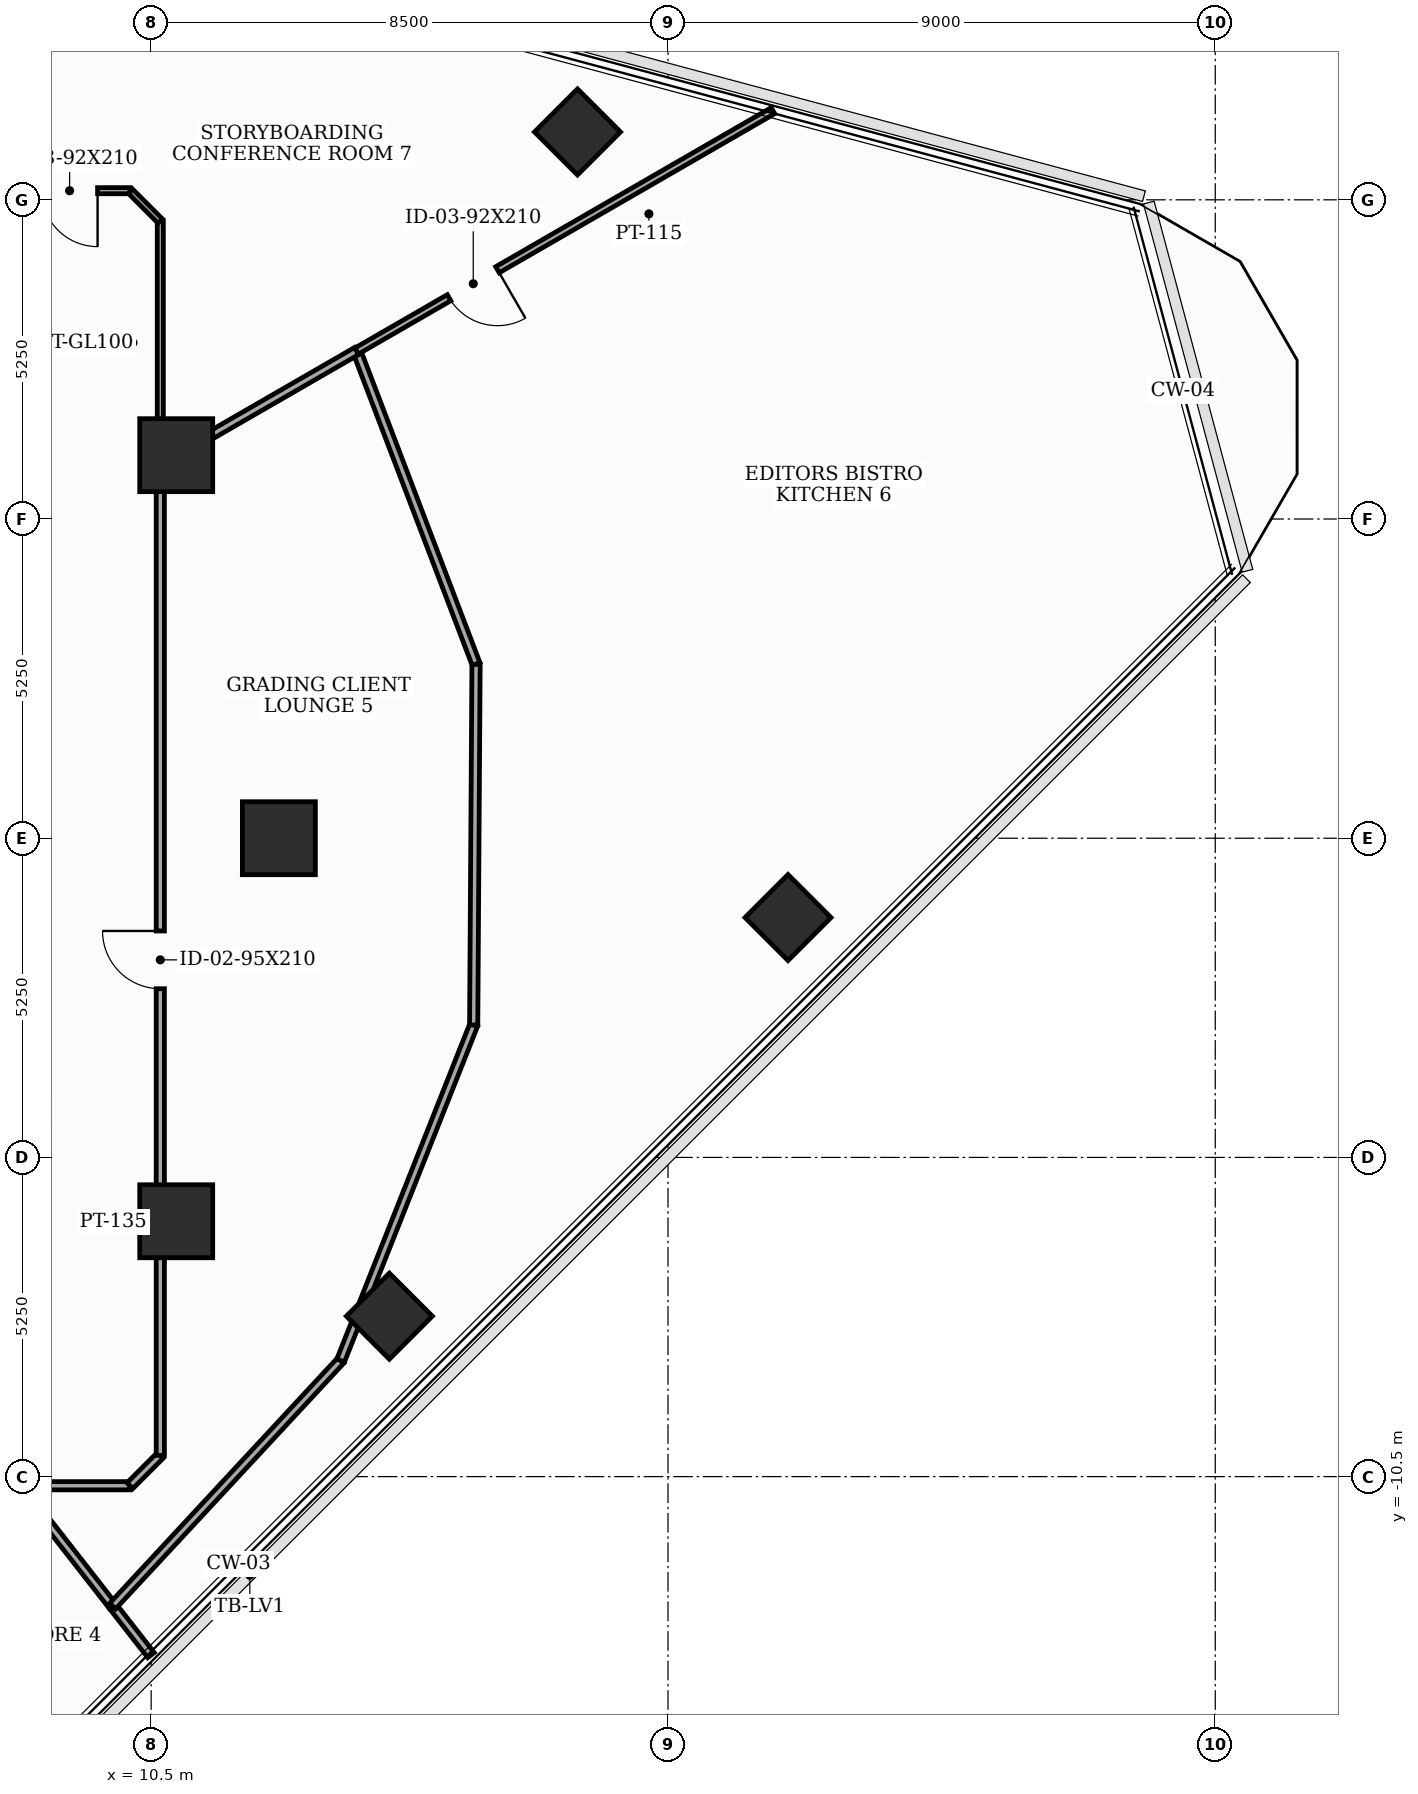
"""IFC4 building model, lengths in metres.
Left out: names, types, materials, properties, quantities, classifications, styles, units other than length and angle.
Written with IfcOpenShell. Run it as: python <this file> out.ifc"""

import sys

from ifc_helpers import new_model, si_unit, direction, frame, frame_2d, origin, origin_2d, place, context, subcontext, project, spatial, rectangle, extrude, element, fill, save


model = new_model("IFC4")
c1 = context("Model", 3, precision=1e-05, world=origin(), true_north=direction((0.0, 1.0)))
c2 = subcontext(c1, "Body", "Model", "MODEL_VIEW")
j1 = project(units=[si_unit("LENGTHUNIT", "METRE"), si_unit("PLANEANGLEUNIT", "RADIAN")], contexts=[c1])
p1 = place(None, origin())
s1 = spatial("IfcSite", under=j1, at=p1, CompositionType="ELEMENT")
p2 = place(p1, origin())
s2 = spatial("IfcBuilding", under=s1, at=p2, CompositionType="ELEMENT")
p3 = place(p2, frame((0.0, 0.0, 206.4)))
s3 = spatial("IfcBuildingStorey", under=s2, at=p3, CompositionType="ELEMENT", Elevation=206.4)
for number, where, z_axis, x_axis in (
    (1, (12.6, 0.0, 0.0), (0.0, 0.0, 1.0), (1.0, 0.0, 0.0)),
    (2, (10.912, 6.3, 0.0), (0.0, 0.0, 1.0), (1.0, 0.0, 0.0)),
    (3, (10.912, -6.3, 0.0), (0.0, 0.0, 1.0), (1.0, 0.0, 0.0)),
):
    element("IfcColumn", number, at=place(p3, frame(where, z_axis=z_axis, x_axis=x_axis)), inside=s3, PredefinedType="COLUMN", context=c2, shape_type="SweptSolid", body=[
        extrude(rectangle(XDim=1.2, YDim=1.2, at=origin_2d()), origin(), (0.0, 0.0, 1.0), 3.7),
    ])
for number, where, z_axis, x_axis in (
    (4, (14.417, -7.861, 0.0), (0.0, 0.0, 1.0), (0.707, 0.707, 0.0)),
    (5, (20.973, -1.305, 0.0), (0.0, 0.0, 1.0), (0.707, 0.707, 0.0)),
    (6, (17.511, 11.616, 0.0), (0.0, 0.0, 1.0), (0.707, 0.707, 0.0)),
):
    element("IfcColumn", number, at=place(p3, frame(where, z_axis=z_axis, x_axis=x_axis)), inside=s3, PredefinedType="COLUMN", context=c2, shape_type="SweptSolid", body=[
        extrude(rectangle(XDim=1.0, YDim=1.0, at=origin_2d()), origin(), (0.0, 0.0, 1.0), 3.7),
    ])
p4 = place(p3, frame((8.321, -10.65, 0.0), z_axis=(0.0, 0.0, 1.0), x_axis=(1.0, 0.0, 0.0)))
e7 = element("IfcWall", 7, at=p4, inside=s3, PredefinedType="PARTITIONING", context=c2, shape_type="SweptSolid", body=[
    extrude(rectangle(XDim=1.829, YDim=0.135, at=frame_2d((0.915, 0.0))), origin(), (0.0, 0.0, 1.0), 3.5),
])
p5 = place(p3, frame((10.15, -10.65, 0.0), z_axis=(0.0, 0.0, 1.0), x_axis=(0.707106781187, 0.707106781187, 0.0)))
e8 = element("IfcWall", 8, at=p5, inside=s3, PredefinedType="PARTITIONING", context=c2, shape_type="SweptSolid", body=[
    extrude(rectangle(XDim=0.707, YDim=0.135, at=frame_2d((0.354, 0.0))), origin(), (0.0, 0.0, 1.0), 3.5),
])
p6 = place(p3, frame((10.65, -10.15, 0.0), z_axis=(0.0, 0.0, 1.0), x_axis=(0.0, 1.0, 0.0)))
e9 = element("IfcWall", 9, at=p6, inside=s3, PredefinedType="PARTITIONING", context=c2, shape_type="SweptSolid", body=[
    extrude(rectangle(XDim=16.299, YDim=0.135, at=frame_2d((8.149, 0.0))), origin(), (0.0, 0.0, 1.0), 2.885),
])
p7 = place(p6, frame((7.675, 0.0, 0.0)))
e10 = element("IfcOpeningElement", 10, at=p7, cuts=e9, PredefinedType="OPENING", context=c2, shape_type="SweptSolid", body=[
    extrude(rectangle(XDim=0.95, YDim=2.1, at=frame_2d((0.475, 1.05))), frame((0.0, 0.077, 0.0), z_axis=(0.0, -1.0, 0.0), x_axis=(1.0, 0.0, 0.0)), (0.0, 0.0, 1.0), 0.155),
])
p8 = place(p3, frame((10.65, 6.149, 0.0), z_axis=(0.0, 0.0, 1.0), x_axis=(0.0, 1.0, 0.0)))
e11 = element("IfcWall", 11, at=p8, inside=s3, PredefinedType="MOVABLE", context=c2, shape_type="SweptSolid", body=[
    extrude(rectangle(XDim=4.001, YDim=0.1, at=frame_2d((2.0, 0.0))), origin(), (0.0, 0.0, 1.0), 2.885),
])
p9 = place(p3, frame((10.65, 10.15, 0.0), z_axis=(0.0, 0.0, 1.0), x_axis=(-0.707106781187, 0.707106781187, 0.0)))
e12 = element("IfcWall", 12, at=p9, inside=s3, PredefinedType="MOVABLE", context=c2, shape_type="SweptSolid", body=[
    extrude(rectangle(XDim=0.707, YDim=0.1, at=frame_2d((0.354, 0.0))), origin(), (0.0, 0.0, 1.0), 3.5),
])
p10 = place(p3, frame((10.15, 10.65, 0.0), z_axis=(0.0, 0.0, 1.0), x_axis=(-1.0, 0.0, 0.0)))
e13 = element("IfcWall", 13, at=p10, inside=s3, PredefinedType="MOVABLE", context=c2, shape_type="SweptSolid", body=[
    extrude(rectangle(XDim=4.956, YDim=0.1, at=frame_2d((2.478, 0.0))), origin(), (0.0, 0.0, 1.0), 2.885),
])
p11 = place(p10, frame((0.531, 0.0, 0.0)))
e14 = element("IfcOpeningElement", 14, at=p11, cuts=e13, PredefinedType="OPENING", context=c2, shape_type="SweptSolid", body=[
    extrude(rectangle(XDim=0.92, YDim=2.1, at=frame_2d((0.46, 1.05))), frame((0.0, 0.06, 0.0), z_axis=(0.0, -1.0, 0.0), x_axis=(1.0, 0.0, 0.0)), (0.0, 0.0, 1.0), 0.12),
])
p12 = place(p3, frame((9.867, -12.629, 0.0), z_axis=(0.0, 0.0, 1.0), x_axis=(-0.615594988766, 0.788062694084, 0.0)))
e15 = element("IfcWall", 15, at=p12, inside=s3, PredefinedType="PARTITIONING", context=c2, shape_type="SweptSolid", body=[
    extrude(rectangle(XDim=2.511, YDim=0.135, at=frame_2d((1.256, 0.0))), origin(), (0.0, 0.0, 1.0), 2.985),
])
p13 = place(p3, frame((10.497, -13.436, 0.0), z_axis=(0.0, 0.0, 1.0), x_axis=(-0.615343153806, 0.788259350128, 0.0)))
e16 = element("IfcWall", 16, at=p13, inside=s3, PredefinedType="PARTITIONING", context=c2, shape_type="SweptSolid", body=[
    extrude(rectangle(XDim=1.024, YDim=0.135, at=frame_2d((0.512, 0.0))), origin(), (0.0, 0.0, 1.0), 3.5),
])
p14 = place(p3, frame((9.867, -12.629, 0.0), z_axis=(0.0, 0.0, 1.0), x_axis=(0.680412009191, 0.732829787706, 0.0)))
e17 = element("IfcWall", 17, at=p14, inside=s3, PredefinedType="PARTITIONING", context=c2, shape_type="SweptSolid", body=[
    extrude(rectangle(XDim=5.51, YDim=0.135, at=frame_2d((2.755, 0.0))), origin(), (0.0, 0.0, 1.0), 2.985),
])
p15 = place(p3, frame((13.616, -8.591, 0.0), z_axis=(0.0, 0.0, 1.0), x_axis=(0.368538720499, 0.929612398526, 0.0)))
e18 = element("IfcWall", 18, at=p15, inside=s3, PredefinedType="PARTITIONING", context=c2, shape_type="SweptSolid", body=[
    extrude(rectangle(XDim=5.937, YDim=0.135, at=frame_2d((2.969, 0.0))), origin(), (0.0, 0.0, 1.0), 2.985),
])
p16 = place(p3, frame((15.804, -3.072, 0.0), z_axis=(0.0, 0.0, 1.0), x_axis=(0.006579346037, 0.999978355869, 0.0)))
e19 = element("IfcWall", 19, at=p16, inside=s3, PredefinedType="PARTITIONING", context=c2, shape_type="SweptSolid", body=[
    extrude(rectangle(XDim=5.937, YDim=0.135, at=frame_2d((2.969, 0.0))), origin(), (0.0, 0.0, 1.0), 2.985),
])
p17 = place(p3, frame((15.843, 2.865, 0.0), z_axis=(0.0, 0.0, 1.0), x_axis=(-0.356314091201, 0.934366238908, 0.0)))
e20 = element("IfcWall", 20, at=p17, inside=s3, PredefinedType="PARTITIONING", context=c2, shape_type="SweptSolid", body=[
    extrude(rectangle(XDim=5.51, YDim=0.135, at=frame_2d((2.755, 0.0))), origin(), (0.0, 0.0, 1.0), 3.5),
])
p18 = place(p3, frame((13.88, 8.013, 0.0), z_axis=(0.0, 0.0, 1.0), x_axis=(-0.866120184914, -0.499835798323, 0.0)))
e21 = element("IfcWall", 21, at=p18, inside=s3, PredefinedType="PARTITIONING", context=c2, shape_type="SweptSolid", body=[
    extrude(rectangle(XDim=3.729, YDim=0.135, at=frame_2d((1.865, 0.0))), origin(), (0.0, 0.0, 1.0), 2.885),
])
p19 = place(p3, frame((20.726, 11.966, 0.0), z_axis=(0.0, 0.0, 1.0), x_axis=(-0.865993758931, -0.500054806489, 0.0)))
e22 = element("IfcWall", 22, at=p19, inside=s3, PredefinedType="PARTITIONING", context=c2, shape_type="SweptSolid", body=[
    extrude(rectangle(XDim=7.906, YDim=0.115, at=frame_2d((3.953, 0.0))), origin(), (0.0, 0.0, 1.0), 2.985),
])
p20 = place(p19, frame((5.232, 0.0, 0.0)))
e23 = element("IfcOpeningElement", 23, at=p20, cuts=e22, PredefinedType="OPENING", context=c2, shape_type="SweptSolid", body=[
    extrude(rectangle(XDim=0.92, YDim=2.1, at=frame_2d((0.46, 1.05))), frame((0.0, 0.067, 0.0), z_axis=(0.0, -1.0, 0.0), x_axis=(1.0, 0.0, 0.0)), (0.0, 0.0, 1.0), 0.135),
])
p21 = place(p7, origin())
e24 = element("IfcDoor", 24, at=p21, inside=s3, OperationType="SINGLE_SWING_RIGHT", PredefinedType="DOOR", context=c2, shape_type="SweptSolid", body=[
    extrude(rectangle(XDim=0.95, YDim=2.1, at=frame_2d((0.475, 1.05))), frame((0.0, 0.025, 0.0), z_axis=(0.0, -1.0, 0.0), x_axis=(1.0, 0.0, 0.0)), (0.0, 0.0, 1.0), 0.05),
])
fill(e10, e24)
p22 = place(p11, origin())
e25 = element("IfcDoor", 25, at=p22, inside=s3, OperationType="SINGLE_SWING_LEFT", PredefinedType="DOOR", context=c2, shape_type="SweptSolid", body=[
    extrude(rectangle(XDim=0.92, YDim=2.1, at=frame_2d((0.46, 1.05))), frame((0.0, 0.025, 0.0), z_axis=(0.0, -1.0, 0.0), x_axis=(1.0, 0.0, 0.0)), (0.0, 0.0, 1.0), 0.05),
])
fill(e14, e25)
p23 = place(p20, origin())
e26 = element("IfcDoor", 26, at=p23, inside=s3, OperationType="SINGLE_SWING_LEFT", PredefinedType="DOOR", context=c2, shape_type="SweptSolid", body=[
    extrude(rectangle(XDim=0.92, YDim=2.1, at=frame_2d((0.46, 1.05))), frame((0.0, 0.025, 0.0), z_axis=(0.0, -1.0, 0.0), x_axis=(1.0, 0.0, 0.0)), (0.0, 0.0, 1.0), 0.05),
])
fill(e23, e26)
save(model, sys.argv[1])
